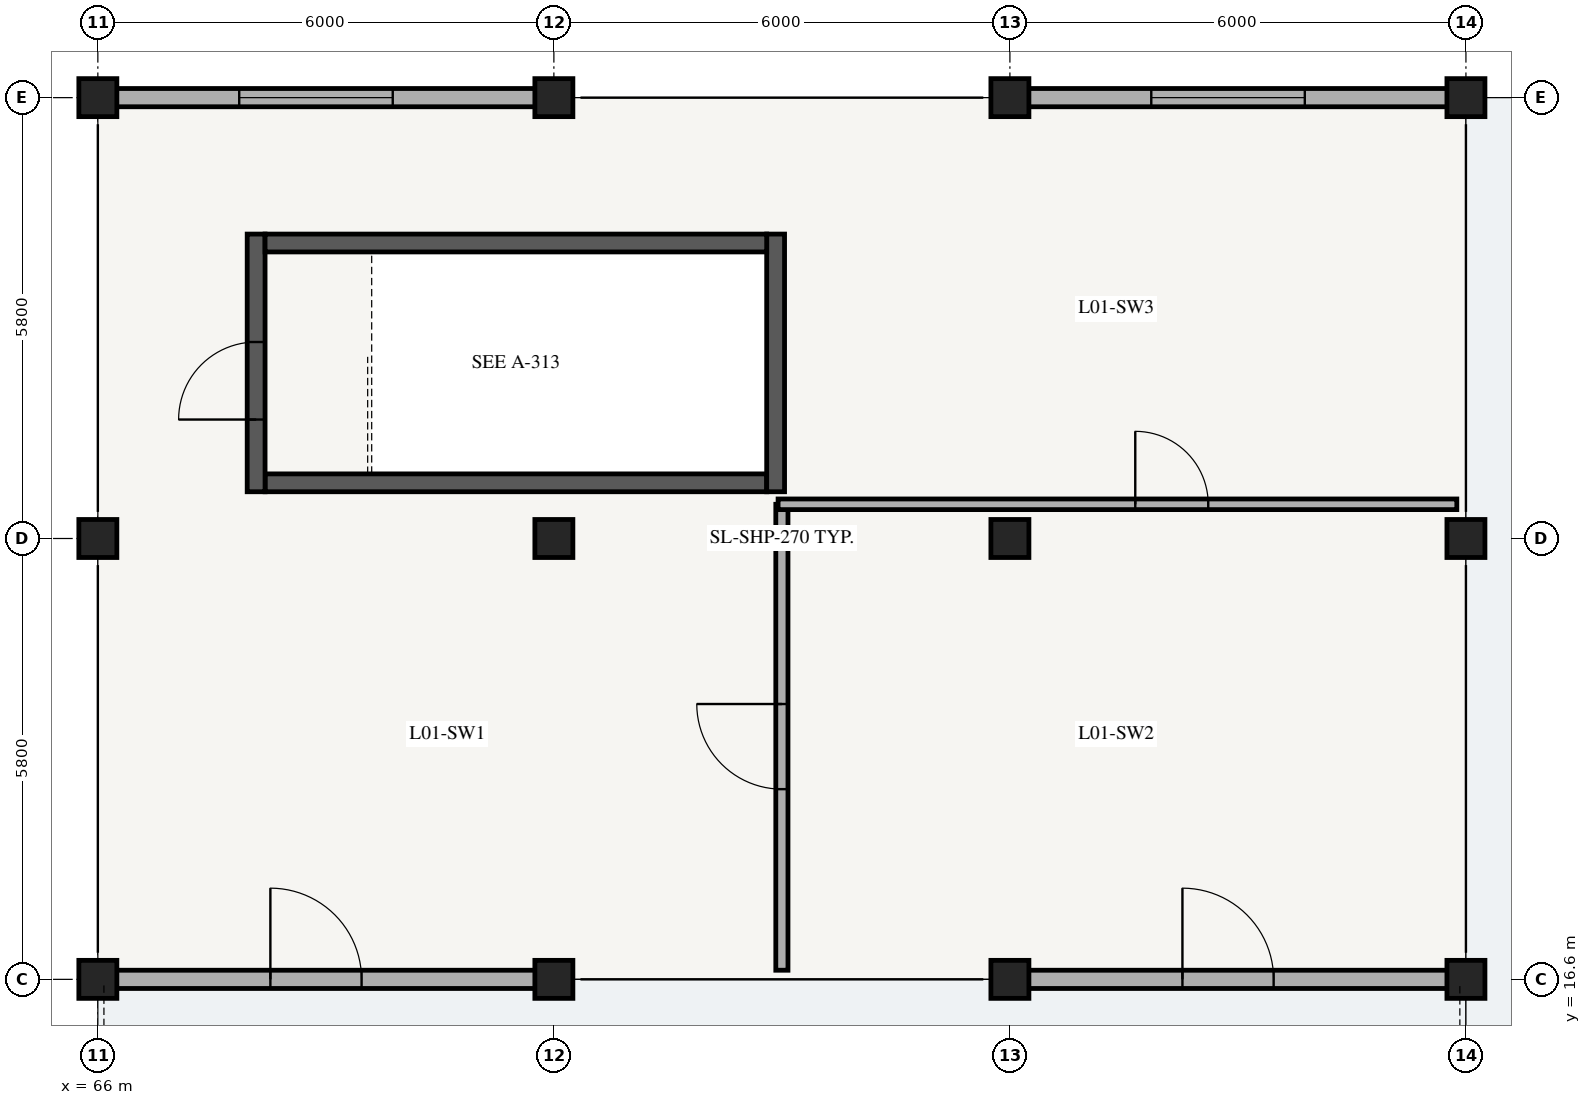
"""IFC4 building model, lengths in metres.
Left out: names, types, materials, properties, quantities, classifications, styles, units other than length and angle.
Written with IfcOpenShell. Run it as: python <this file> out.ifc"""

import sys

from ifc_helpers import new_model, si_unit, direction, frame, frame_2d, origin, origin_2d, place, context, subcontext, project, spatial, rectangle, extrude, element, fill, save


model = new_model("IFC4")
c1 = context("Model", 3, precision=1e-05, world=origin(), true_north=direction((0.0, 1.0)))
c2 = subcontext(c1, "Body", "Model", "MODEL_VIEW")
j1 = project(units=[si_unit("LENGTHUNIT", "METRE"), si_unit("PLANEANGLEUNIT", "RADIAN")], contexts=[c1])
p1 = place(None, origin())
s1 = spatial("IfcSite", under=j1, at=p1, CompositionType="ELEMENT")
p2 = place(p1, origin())
s2 = spatial("IfcBuilding", under=s1, at=p2, CompositionType="ELEMENT")
p3 = place(p2, frame((0.0, 0.0, 4.76)))
s3 = spatial("IfcBuildingStorey", under=s2, at=p3, CompositionType="ELEMENT", Elevation=4.76)
p4 = place(p3, frame((68.2, 23.133, 0.0), z_axis=(0.0, 0.0, 1.0), x_axis=(1.0, 0.0, 0.0)))
e1 = element("IfcWall", 1, at=p4, inside=s3, PredefinedType="SHEAR", context=c2, shape_type="SweptSolid", body=[
    extrude(rectangle(XDim=6.6, YDim=0.235, at=frame_2d((3.3, 0.0))), origin(), (0.0, 0.0, 1.0), 3.83),
])
p5 = place(p3, frame((74.917, 23.015, 0.0), z_axis=(0.0, 0.0, 1.0), x_axis=(0.0, 1.0, 0.0)))
e2 = element("IfcWall", 2, at=p5, inside=s3, PredefinedType="SHEAR", context=c2, shape_type="SweptSolid", body=[
    extrude(rectangle(XDim=3.39, YDim=0.235, at=frame_2d((1.695, 0.0))), origin(), (0.0, 0.0, 1.0), 3.83),
])
p6 = place(p3, frame((68.083, 23.015, 0.0), z_axis=(0.0, 0.0, 1.0), x_axis=(0.0, 1.0, 0.0)))
e3 = element("IfcWall", 3, at=p6, inside=s3, PredefinedType="SHEAR", context=c2, shape_type="SweptSolid", body=[
    extrude(rectangle(XDim=3.39, YDim=0.235, at=frame_2d((1.695, 0.0))), origin(), (0.0, 0.0, 1.0), 3.83),
])
p7 = place(p6, frame((0.95, 0.0, 0.0)))
e4 = element("IfcOpeningElement", 4, at=p7, cuts=e3, PredefinedType="OPENING", context=c2, shape_type="SweptSolid", body=[
    extrude(rectangle(XDim=1.02, YDim=2.14, at=frame_2d((0.51, 1.07))), frame((0.0, 0.127, 0.0), z_axis=(0.0, -1.0, 0.0), x_axis=(1.0, 0.0, 0.0)), (0.0, 0.0, 1.0), 0.255),
])
p8 = place(p3, frame((68.2, 26.288, 0.0), z_axis=(0.0, 0.0, 1.0), x_axis=(1.0, 0.0, 0.0)))
e5 = element("IfcWall", 5, at=p8, inside=s3, PredefinedType="SHEAR", context=c2, shape_type="SweptSolid", body=[
    extrude(rectangle(XDim=6.6, YDim=0.235, at=frame_2d((3.3, 0.0))), origin(), (0.0, 0.0, 1.0), 3.83),
])
for number, where, z_axis, x_axis in (
    (6, (66.0, 16.6, 0.0), (0.0, 0.0, 1.0), (1.0, 0.0, 0.0)),
    (7, (66.0, 22.4, 0.0), (0.0, 0.0, 1.0), (1.0, 0.0, 0.0)),
    (8, (66.0, 28.2, 0.0), (0.0, 0.0, 1.0), (1.0, 0.0, 0.0)),
    (9, (72.0, 16.6, 0.0), (0.0, 0.0, 1.0), (1.0, 0.0, 0.0)),
    (10, (72.0, 22.4, 0.0), (0.0, 0.0, 1.0), (1.0, 0.0, 0.0)),
    (11, (72.0, 28.2, 0.0), (0.0, 0.0, 1.0), (1.0, 0.0, 0.0)),
    (12, (78.0, 16.6, 0.0), (0.0, 0.0, 1.0), (1.0, 0.0, 0.0)),
    (13, (78.0, 22.4, 0.0), (0.0, 0.0, 1.0), (1.0, 0.0, 0.0)),
    (14, (78.0, 28.2, 0.0), (0.0, 0.0, 1.0), (1.0, 0.0, 0.0)),
    (15, (84.0, 16.6, 0.0), (0.0, 0.0, 1.0), (1.0, 0.0, 0.0)),
    (16, (84.0, 22.4, 0.0), (0.0, 0.0, 1.0), (1.0, 0.0, 0.0)),
    (17, (84.0, 28.2, 0.0), (0.0, 0.0, 1.0), (1.0, 0.0, 0.0)),
):
    element("IfcColumn", number, at=place(p3, frame(where, z_axis=z_axis, x_axis=x_axis)), inside=s3, PredefinedType="COLUMN", context=c2, shape_type="SweptSolid", body=[
        extrude(rectangle(XDim=0.5, YDim=0.5, at=origin_2d()), origin(), (0.0, 0.0, 1.0), 4.08),
    ])
p9 = place(p3, frame((66.22, 16.6, 0.0), z_axis=(0.0, 0.0, 1.0), x_axis=(1.0, 0.0, 0.0)))
e18 = element("IfcWall", 18, at=p9, inside=s3, PredefinedType="SOLIDWALL", context=c2, shape_type="SweptSolid", body=[
    extrude(rectangle(XDim=5.56, YDim=0.24, at=frame_2d((2.78, 0.0))), origin(), (0.0, 0.0, 1.0), 3.34),
])
p10 = place(p9, frame((2.05, 0.0, 0.0)))
e19 = element("IfcOpeningElement", 19, at=p10, cuts=e18, PredefinedType="OPENING", context=c2, shape_type="SweptSolid", body=[
    extrude(rectangle(XDim=1.2, YDim=2.15, at=frame_2d((0.6, 1.075))), frame((0.0, 0.13, 0.0), z_axis=(0.0, -1.0, 0.0), x_axis=(1.0, 0.0, 0.0)), (0.0, 0.0, 1.0), 0.26),
])
p11 = place(p3, frame((78.22, 16.6, 0.0), z_axis=(0.0, 0.0, 1.0), x_axis=(1.0, 0.0, 0.0)))
e20 = element("IfcWall", 20, at=p11, inside=s3, PredefinedType="SOLIDWALL", context=c2, shape_type="SweptSolid", body=[
    extrude(rectangle(XDim=5.56, YDim=0.24, at=frame_2d((2.78, 0.0))), origin(), (0.0, 0.0, 1.0), 3.34),
])
p12 = place(p11, frame((2.05, 0.0, 0.0)))
e21 = element("IfcOpeningElement", 21, at=p12, cuts=e20, PredefinedType="OPENING", context=c2, shape_type="SweptSolid", body=[
    extrude(rectangle(XDim=1.2, YDim=2.15, at=frame_2d((0.6, 1.075))), frame((0.0, 0.13, 0.0), z_axis=(0.0, -1.0, 0.0), x_axis=(1.0, 0.0, 0.0)), (0.0, 0.0, 1.0), 0.26),
])
p13 = place(p3, frame((66.22, 28.2, 0.0), z_axis=(0.0, 0.0, 1.0), x_axis=(1.0, 0.0, 0.0)))
e22 = element("IfcWall", 22, at=p13, inside=s3, PredefinedType="SOLIDWALL", context=c2, shape_type="SweptSolid", body=[
    extrude(rectangle(XDim=5.56, YDim=0.24, at=frame_2d((2.78, 0.0))), origin(), (0.0, 0.0, 1.0), 3.34),
])
p14 = place(p13, frame((1.64, 0.0, 0.55)))
e23 = element("IfcOpeningElement", 23, at=p14, cuts=e22, PredefinedType="OPENING", context=c2, shape_type="SweptSolid", body=[
    extrude(rectangle(XDim=2.02, YDim=1.95, at=frame_2d((1.01, 0.975))), frame((0.0, 0.13, 0.0), z_axis=(0.0, -1.0, 0.0), x_axis=(1.0, 0.0, 0.0)), (0.0, 0.0, 1.0), 0.26),
])
p15 = place(p3, frame((78.22, 28.2, 0.0), z_axis=(0.0, 0.0, 1.0), x_axis=(1.0, 0.0, 0.0)))
e24 = element("IfcWall", 24, at=p15, inside=s3, PredefinedType="SOLIDWALL", context=c2, shape_type="SweptSolid", body=[
    extrude(rectangle(XDim=5.56, YDim=0.24, at=frame_2d((2.78, 0.0))), origin(), (0.0, 0.0, 1.0), 3.34),
])
p16 = place(p15, frame((1.64, 0.0, 0.55)))
e25 = element("IfcOpeningElement", 25, at=p16, cuts=e24, PredefinedType="OPENING", context=c2, shape_type="SweptSolid", body=[
    extrude(rectangle(XDim=2.02, YDim=1.95, at=frame_2d((1.01, 0.975))), frame((0.0, 0.13, 0.0), z_axis=(0.0, -1.0, 0.0), x_axis=(1.0, 0.0, 0.0)), (0.0, 0.0, 1.0), 0.26),
])
p17 = place(p3, frame((75.0, 16.72, 0.0), z_axis=(0.0, 0.0, 1.0), x_axis=(0.0, 1.0, 0.0)))
e26 = element("IfcWall", 26, at=p17, inside=s3, PredefinedType="PARTITIONING", context=c2, shape_type="SweptSolid", body=[
    extrude(rectangle(XDim=6.13, YDim=0.16, at=frame_2d((3.065, 0.0))), origin(), (0.0, 0.0, 1.0), 2.86),
])
p18 = place(p17, frame((2.382, 0.0, 0.0)))
e27 = element("IfcOpeningElement", 27, at=p18, cuts=e26, PredefinedType="OPENING", context=c2, shape_type="SweptSolid", body=[
    extrude(rectangle(XDim=1.12, YDim=2.12, at=frame_2d((0.56, 1.06))), frame((0.0, 0.09, 0.0), z_axis=(0.0, -1.0, 0.0), x_axis=(1.0, 0.0, 0.0)), (0.0, 0.0, 1.0), 0.18),
])
p19 = place(p3, frame((74.95, 22.85, 0.0), z_axis=(0.0, 0.0, 1.0), x_axis=(1.0, 0.0, 0.0)))
e28 = element("IfcWall", 28, at=p19, inside=s3, PredefinedType="PLUMBINGWALL", context=c2, shape_type="SweptSolid", body=[
    extrude(rectangle(XDim=8.93, YDim=0.14, at=frame_2d((4.465, 0.0))), origin(), (0.0, 0.0, 1.0), 2.86),
])
p20 = place(p19, frame((4.699, 0.0, 0.0)))
e29 = element("IfcOpeningElement", 29, at=p20, cuts=e28, PredefinedType="OPENING", context=c2, shape_type="SweptSolid", body=[
    extrude(rectangle(XDim=0.96, YDim=2.1, at=frame_2d((0.48, 1.05))), frame((0.0, 0.08, 0.0), z_axis=(0.0, -1.0, 0.0), x_axis=(1.0, 0.0, 0.0)), (0.0, 0.0, 1.0), 0.16),
])
p21 = place(p10, origin())
e30 = element("IfcDoor", 30, at=p21, inside=s3, OperationType="SINGLE_SWING_LEFT", PredefinedType="DOOR", context=c2, shape_type="SweptSolid", body=[
    extrude(rectangle(XDim=1.2, YDim=2.15, at=frame_2d((0.6, 1.075))), frame((0.0, 0.025, 0.0), z_axis=(0.0, -1.0, 0.0), x_axis=(1.0, 0.0, 0.0)), (0.0, 0.0, 1.0), 0.05),
])
fill(e19, e30)
p22 = place(p12, origin())
e31 = element("IfcDoor", 31, at=p22, inside=s3, OperationType="SINGLE_SWING_LEFT", PredefinedType="DOOR", context=c2, shape_type="SweptSolid", body=[
    extrude(rectangle(XDim=1.2, YDim=2.15, at=frame_2d((0.6, 1.075))), frame((0.0, 0.025, 0.0), z_axis=(0.0, -1.0, 0.0), x_axis=(1.0, 0.0, 0.0)), (0.0, 0.0, 1.0), 0.05),
])
fill(e21, e31)
p23 = place(p14, origin())
e32 = element("IfcWindow", 32, at=p23, inside=s3, PartitioningType="SINGLE_PANEL", PredefinedType="WINDOW", context=c2, shape_type="SweptSolid", body=[
    extrude(rectangle(XDim=2.02, YDim=1.95, at=frame_2d((1.01, 0.975))), frame((0.0, 0.03, 0.0), z_axis=(0.0, -1.0, 0.0), x_axis=(1.0, 0.0, 0.0)), (0.0, 0.0, 1.0), 0.06),
])
fill(e23, e32)
p24 = place(p16, origin())
e33 = element("IfcWindow", 33, at=p24, inside=s3, PartitioningType="SINGLE_PANEL", PredefinedType="WINDOW", context=c2, shape_type="SweptSolid", body=[
    extrude(rectangle(XDim=2.02, YDim=1.95, at=frame_2d((1.01, 0.975))), frame((0.0, 0.03, 0.0), z_axis=(0.0, -1.0, 0.0), x_axis=(1.0, 0.0, 0.0)), (0.0, 0.0, 1.0), 0.06),
])
fill(e25, e33)
p25 = place(p7, origin())
e34 = element("IfcDoor", 34, at=p25, inside=s3, OperationType="SINGLE_SWING_LEFT", PredefinedType="DOOR", context=c2, shape_type="SweptSolid", body=[
    extrude(rectangle(XDim=1.02, YDim=2.14, at=frame_2d((0.51, 1.07))), frame((0.0, 0.025, 0.0), z_axis=(0.0, -1.0, 0.0), x_axis=(1.0, 0.0, 0.0)), (0.0, 0.0, 1.0), 0.05),
])
fill(e4, e34)
p26 = place(p18, origin())
e35 = element("IfcDoor", 35, at=p26, inside=s3, OperationType="SINGLE_SWING_RIGHT", PredefinedType="DOOR", context=c2, shape_type="SweptSolid", body=[
    extrude(rectangle(XDim=1.12, YDim=2.12, at=frame_2d((0.56, 1.06))), frame((0.0, 0.025, 0.0), z_axis=(0.0, -1.0, 0.0), x_axis=(1.0, 0.0, 0.0)), (0.0, 0.0, 1.0), 0.05),
])
fill(e27, e35)
p27 = place(p20, origin())
e36 = element("IfcDoor", 36, at=p27, inside=s3, OperationType="SINGLE_SWING_LEFT", PredefinedType="DOOR", context=c2, shape_type="SweptSolid", body=[
    extrude(rectangle(XDim=0.96, YDim=2.1, at=frame_2d((0.48, 1.05))), frame((0.0, 0.025, 0.0), z_axis=(0.0, -1.0, 0.0), x_axis=(1.0, 0.0, 0.0)), (0.0, 0.0, 1.0), 0.05),
])
fill(e29, e36)
save(model, sys.argv[1])
